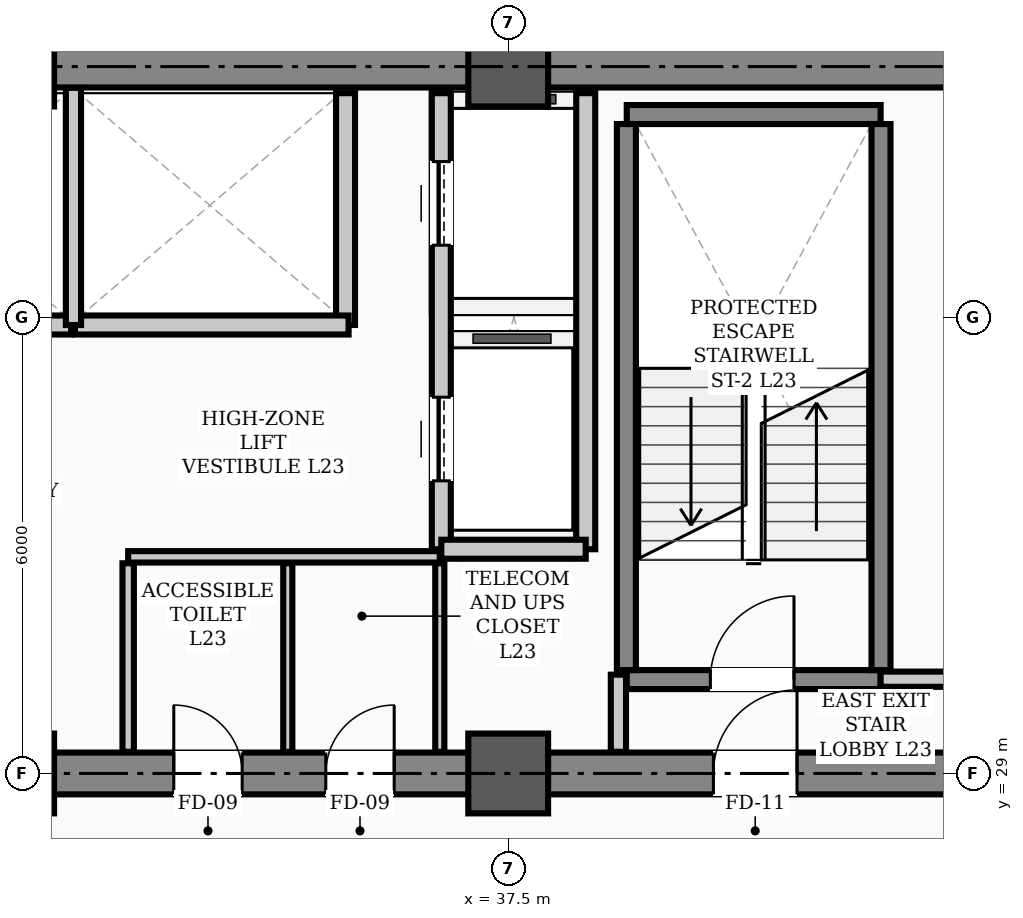
"""IFC4 building model, lengths in metres.
Left out: names, types, materials, properties, quantities, classifications, styles, units other than length and angle.
Written with IfcOpenShell. Run it as: python <this file> out.ifc"""

import sys

from ifc_helpers import new_model, si_unit, direction, frame, frame_2d, origin, origin_2d, place, context, subcontext, project, spatial, rectangle, hollow_rectangle, extrude, element, fill, save


model = new_model("IFC4")
c1 = context("Model", 3, precision=1e-05, world=origin(), true_north=direction((0.0, 1.0)))
c2 = subcontext(c1, "Body", "Model", "MODEL_VIEW")
j1 = project(units=[si_unit("LENGTHUNIT", "METRE"), si_unit("PLANEANGLEUNIT", "RADIAN")], contexts=[c1])
p1 = place(None, origin())
s1 = spatial("IfcSite", under=j1, at=p1, CompositionType="ELEMENT")
p2 = place(p1, origin())
s2 = spatial("IfcBuilding", under=s1, at=p2, CompositionType="ELEMENT")
p3 = place(p2, frame((0.0, 0.0, 92.8)))
s3 = spatial("IfcBuildingStorey", under=s2, at=p3, CompositionType="ELEMENT", Elevation=92.8)
for number, where, z_axis, x_axis in (
    (1, (31.0, 29.0, 0.0), (0.0, 0.0, 1.0), (1.0, 0.0, 0.0)),
    (2, (31.0, 38.3, 0.0), (0.0, 0.0, 1.0), (1.0, 0.0, 0.0)),
    (3, (37.5, 29.0, 0.0), (0.0, 0.0, 1.0), (1.0, 0.0, 0.0)),
    (4, (37.5, 38.3, 0.0), (0.0, 0.0, 1.0), (1.0, 0.0, 0.0)),
):
    element("IfcColumn", number, at=place(p3, frame(where, z_axis=z_axis, x_axis=x_axis)), inside=s3, PredefinedType="COLUMN", context=c2, shape_type="SweptSolid", body=[
        extrude(hollow_rectangle(XDim=1.05, YDim=1.05, WallThickness=0.038, InnerFilletRadius=0.019, OuterFilletRadius=0.057, at=origin_2d()), origin(), (0.0, 0.0, 1.0), 3.9),
    ])
p4 = place(p3, frame((13.5, 29.0, 0.0), z_axis=(0.0, 0.0, 1.0), x_axis=(1.0, 0.0, 0.0)))
e5 = element("IfcWall", 5, at=p4, inside=s3, PredefinedType="SHEAR", context=c2, shape_type="SweptSolid", body=[
    extrude(rectangle(XDim=30.5, YDim=0.55, at=frame_2d((15.25, 0.0))), origin(), (0.0, 0.0, 1.0), 3.72),
])
p5 = place(p4, frame((1.75, 0.0, 0.0)))
e6 = element("IfcOpeningElement", 6, at=p5, cuts=e5, PredefinedType="OPENING", context=c2, shape_type="SweptSolid", body=[
    extrude(rectangle(XDim=1.1, YDim=2.08, at=frame_2d((0.55, 1.04))), frame((0.0, 0.285, 0.0), z_axis=(0.0, -1.0, 0.0), x_axis=(1.0, 0.0, 0.0)), (0.0, 0.0, 1.0), 0.57),
])
p6 = place(p4, frame((26.7, 0.0, 0.0)))
e7 = element("IfcOpeningElement", 7, at=p6, cuts=e5, PredefinedType="OPENING", context=c2, shape_type="SweptSolid", body=[
    extrude(rectangle(XDim=1.1, YDim=2.08, at=frame_2d((0.55, 1.04))), frame((0.0, 0.285, 0.0), z_axis=(0.0, -1.0, 0.0), x_axis=(1.0, 0.0, 0.0)), (0.0, 0.0, 1.0), 0.57),
])
p7 = place(p4, frame((6.8, 0.0, 0.0)))
e8 = element("IfcOpeningElement", 8, at=p7, cuts=e5, PredefinedType="OPENING", context=c2, shape_type="SweptSolid", body=[
    extrude(rectangle(XDim=1.1, YDim=2.08, at=frame_2d((0.55, 1.04))), frame((0.0, 0.285, 0.0), z_axis=(0.0, -1.0, 0.0), x_axis=(1.0, 0.0, 0.0)), (0.0, 0.0, 1.0), 0.57),
])
p8 = place(p4, frame((13.2, 0.0, 0.0)))
e9 = element("IfcOpeningElement", 9, at=p8, cuts=e5, PredefinedType="OPENING", context=c2, shape_type="SweptSolid", body=[
    extrude(rectangle(XDim=1.6, YDim=2.08, at=frame_2d((0.8, 1.04))), frame((0.0, 0.285, 0.0), z_axis=(0.0, -1.0, 0.0), x_axis=(1.0, 0.0, 0.0)), (0.0, 0.0, 1.0), 0.57),
])
p9 = place(p4, frame((19.6, 0.0, 0.0)))
e10 = element("IfcOpeningElement", 10, at=p9, cuts=e5, PredefinedType="OPENING", context=c2, shape_type="SweptSolid", body=[
    extrude(rectangle(XDim=0.9, YDim=2.08, at=frame_2d((0.45, 1.04))), frame((0.0, 0.285, 0.0), z_axis=(0.0, -1.0, 0.0), x_axis=(1.0, 0.0, 0.0)), (0.0, 0.0, 1.0), 0.57),
])
p10 = place(p4, frame((21.6, 0.0, 0.0)))
e11 = element("IfcOpeningElement", 11, at=p10, cuts=e5, PredefinedType="OPENING", context=c2, shape_type="SweptSolid", body=[
    extrude(rectangle(XDim=0.9, YDim=2.08, at=frame_2d((0.45, 1.04))), frame((0.0, 0.285, 0.0), z_axis=(0.0, -1.0, 0.0), x_axis=(1.0, 0.0, 0.0)), (0.0, 0.0, 1.0), 0.57),
])
p11 = place(p3, frame((13.5, 38.3, 0.0), z_axis=(0.0, 0.0, 1.0), x_axis=(1.0, 0.0, 0.0)))
e12 = element("IfcWall", 12, at=p11, inside=s3, PredefinedType="SHEAR", context=c2, shape_type="SweptSolid", body=[
    extrude(rectangle(XDim=30.5, YDim=0.55, at=frame_2d((15.25, 0.0))), origin(), (0.0, 0.0, 1.0), 3.72),
])
p12 = place(p3, frame((39.06, 30.235, 0.0), z_axis=(0.0, 0.0, 1.0), x_axis=(1.0, 0.0, 0.0)))
e13 = element("IfcWall", 13, at=p12, inside=s3, PredefinedType="STANDARD", context=c2, shape_type="SweptSolid", body=[
    extrude(rectangle(XDim=3.34, YDim=0.25, at=frame_2d((1.67, 0.0))), origin(), (0.0, 0.0, 1.0), 3.72),
])
p13 = place(p12, frame((1.1, 0.0, 0.0)))
e14 = element("IfcOpeningElement", 14, at=p13, cuts=e13, PredefinedType="OPENING", context=c2, shape_type="SweptSolid", body=[
    extrude(rectangle(XDim=1.1, YDim=2.08, at=frame_2d((0.55, 1.04))), frame((0.0, 0.135, 0.0), z_axis=(0.0, -1.0, 0.0), x_axis=(1.0, 0.0, 0.0)), (0.0, 0.0, 1.0), 0.27),
])
p14 = place(p3, frame((39.06, 37.669, 0.0), z_axis=(0.0, 0.0, 1.0), x_axis=(1.0, 0.0, 0.0)))
e15 = element("IfcWall", 15, at=p14, inside=s3, PredefinedType="STANDARD", context=c2, shape_type="SweptSolid", body=[
    extrude(rectangle(XDim=3.34, YDim=0.25, at=frame_2d((1.67, 0.0))), origin(), (0.0, 0.0, 1.0), 3.72),
])
for number, where, z_axis, x_axis in (
    (16, (39.055, 30.36, 0.0), (0.0, 0.0, 1.0), (0.0, 1.0, 0.0)),
    (17, (42.405, 30.36, 0.0), (0.0, 0.0, 1.0), (0.0, 1.0, 0.0)),
):
    element("IfcWall", number, at=place(p3, frame(where, z_axis=z_axis, x_axis=x_axis)), inside=s3, PredefinedType="STANDARD", context=c2, shape_type="SweptSolid", body=[
        extrude(rectangle(XDim=7.184, YDim=0.25, at=frame_2d((3.592, 0.0))), origin(), (0.0, 0.0, 1.0), 3.72),
    ])
p15 = place(p3, frame((36.62, 31.95, 0.0), z_axis=(0.0, 0.0, 1.0), x_axis=(0.0, 1.0, 0.0)))
e18 = element("IfcWall", 18, at=p15, inside=s3, PredefinedType="STANDARD", context=c2, shape_type="SweptSolid", body=[
    extrude(rectangle(XDim=6.0, YDim=0.25, at=frame_2d((3.0, 0.0))), origin(), (0.0, 0.0, 1.0), 3.3),
])
p16 = place(p15, frame((0.9, 0.0, 0.0)))
e19 = element("IfcOpeningElement", 19, at=p16, cuts=e18, PredefinedType="OPENING", context=c2, shape_type="SweptSolid", body=[
    extrude(rectangle(XDim=1.1, YDim=2.08, at=frame_2d((0.55, 1.04))), frame((0.0, 0.135, 0.0), z_axis=(0.0, -1.0, 0.0), x_axis=(1.0, 0.0, 0.0)), (0.0, 0.0, 1.0), 0.27),
])
p17 = place(p15, frame((4.0, 0.0, 0.0)))
e20 = element("IfcOpeningElement", 20, at=p17, cuts=e18, PredefinedType="OPENING", context=c2, shape_type="SweptSolid", body=[
    extrude(rectangle(XDim=1.1, YDim=2.08, at=frame_2d((0.55, 1.04))), frame((0.0, 0.135, 0.0), z_axis=(0.0, -1.0, 0.0), x_axis=(1.0, 0.0, 0.0)), (0.0, 0.0, 1.0), 0.27),
])
p18 = place(p3, frame((38.52, 31.95, 0.0), z_axis=(0.0, 0.0, 1.0), x_axis=(0.0, 1.0, 0.0)))
e21 = element("IfcWall", 21, at=p18, inside=s3, PredefinedType="STANDARD", context=c2, shape_type="SweptSolid", body=[
    extrude(rectangle(XDim=6.0, YDim=0.25, at=frame_2d((3.0, 0.0))), origin(), (0.0, 0.0, 1.0), 3.3),
])
p19 = place(p3, frame((36.62, 31.95, 0.0), z_axis=(0.0, 0.0, 1.0), x_axis=(1.0, 0.0, 0.0)))
e22 = element("IfcWall", 22, at=p19, inside=s3, PredefinedType="STANDARD", context=c2, shape_type="SweptSolid", body=[
    extrude(rectangle(XDim=1.9, YDim=0.25, at=frame_2d((0.95, 0.0))), origin(), (0.0, 0.0, 1.0), 3.48),
])
p20 = place(p3, frame((35.36, 34.9, 0.0), z_axis=(0.0, 0.0, 1.0), x_axis=(0.0, 1.0, 0.0)))
e23 = element("IfcWall", 23, at=p20, inside=s3, PredefinedType="STANDARD", context=c2, shape_type="SweptSolid", body=[
    extrude(rectangle(XDim=3.05, YDim=0.25, at=frame_2d((1.525, 0.0))), origin(), (0.0, 0.0, 1.0), 3.3),
])
p21 = place(p3, frame((28.2, 34.9, 0.0), z_axis=(0.0, 0.0, 1.0), x_axis=(1.0, 0.0, 0.0)))
e24 = element("IfcWall", 24, at=p21, inside=s3, PredefinedType="STANDARD", context=c2, shape_type="SweptSolid", body=[
    extrude(rectangle(XDim=3.55, YDim=0.25, at=frame_2d((1.775, 0.0))), origin(), (0.0, 0.0, 1.0), 3.72),
])
p22 = place(p3, frame((31.8, 34.9, 0.0), z_axis=(0.0, 0.0, 1.0), x_axis=(1.0, 0.0, 0.0)))
e25 = element("IfcWall", 25, at=p22, inside=s3, PredefinedType="STANDARD", context=c2, shape_type="SweptSolid", body=[
    extrude(rectangle(XDim=3.6, YDim=0.25, at=frame_2d((1.8, 0.0))), origin(), (0.0, 0.0, 1.0), 3.72),
])
p23 = place(p3, frame((42.4, 30.24, 0.0), z_axis=(0.0, 0.0, 1.0), x_axis=(1.0, 0.0, 0.0)))
e26 = element("IfcWall", 26, at=p23, inside=s3, PredefinedType="STANDARD", context=c2, shape_type="SweptSolid", body=[
    extrude(rectangle(XDim=1.315, YDim=0.2, at=frame_2d((0.658, 0.0))), origin(), (0.0, 0.0, 1.0), 3.1),
])
p24 = place(p3, frame((32.5, 31.85, 0.0), z_axis=(0.0, 0.0, 1.0), x_axis=(1.0, 0.0, 0.0)))
e27 = element("IfcWall", 27, at=p24, inside=s3, PredefinedType="PARTITIONING", context=c2, shape_type="SweptSolid", body=[
    extrude(rectangle(XDim=4.1, YDim=0.15, at=frame_2d((2.05, 0.0))), origin(), (0.0, 0.0, 1.0), 3.72),
])
p25 = place(p3, frame((38.95, 29.285, 0.0), z_axis=(0.0, 0.0, 1.0), x_axis=(0.0, 1.0, 0.0)))
e28 = element("IfcWall", 28, at=p25, inside=s3, PredefinedType="STANDARD", context=c2, shape_type="SweptSolid", body=[
    extrude(rectangle(XDim=1.015, YDim=0.2, at=frame_2d((0.508, 0.0))), origin(), (0.0, 0.0, 1.0), 3.3),
])
p26 = place(p3, frame((32.5, 29.285, 0.0), z_axis=(0.0, 0.0, 1.0), x_axis=(0.0, 1.0, 0.0)))
e29 = element("IfcWall", 29, at=p26, inside=s3, PredefinedType="PARTITIONING", context=c2, shape_type="SweptSolid", body=[
    extrude(rectangle(XDim=2.48, YDim=0.15, at=frame_2d((1.24, 0.0))), origin(), (0.0, 0.0, 1.0), 3.3),
])
for number, where, z_axis, x_axis in (
    (30, (36.6, 29.285, 0.0), (0.0, 0.0, 1.0), (0.0, 1.0, 0.0)),
    (31, (34.6, 29.285, 0.0), (0.0, 0.0, 1.0), (0.0, 1.0, 0.0)),
):
    element("IfcWall", number, at=place(p3, frame(where, z_axis=z_axis, x_axis=x_axis)), inside=s3, PredefinedType="PARTITIONING", context=c2, shape_type="SweptSolid", body=[
        extrude(rectangle(XDim=2.48, YDim=0.12, at=frame_2d((1.24, 0.0))), origin(), (0.0, 0.0, 1.0), 3.3),
    ])
p27 = place(p3, frame((31.78, 34.9, 0.0), z_axis=(0.0, 0.0, 1.0), x_axis=(0.0, 1.0, 0.0)))
e32 = element("IfcWall", 32, at=p27, inside=s3, PredefinedType="STANDARD", context=c2, shape_type="SweptSolid", body=[
    extrude(rectangle(XDim=3.12, YDim=0.2, at=frame_2d((1.56, 0.0))), origin(), (0.0, 0.0, 1.0), 3.3),
])
p28 = place(p13, origin())
e33 = element("IfcDoor", 33, at=p28, inside=s3, OperationType="SINGLE_SWING_RIGHT", PredefinedType="DOOR", context=c2, shape_type="SweptSolid", body=[
    extrude(rectangle(XDim=1.1, YDim=2.08, at=frame_2d((0.55, 1.04))), frame((0.0, 0.025, 0.0), z_axis=(0.0, -1.0, 0.0), x_axis=(1.0, 0.0, 0.0)), (0.0, 0.0, 1.0), 0.05),
])
fill(e14, e33)
p29 = place(p6, origin())
e34 = element("IfcDoor", 34, at=p29, inside=s3, OperationType="SINGLE_SWING_RIGHT", PredefinedType="DOOR", context=c2, shape_type="SweptSolid", body=[
    extrude(rectangle(XDim=1.1, YDim=2.08, at=frame_2d((0.55, 1.04))), frame((0.0, 0.025, 0.0), z_axis=(0.0, -1.0, 0.0), x_axis=(1.0, 0.0, 0.0)), (0.0, 0.0, 1.0), 0.05),
])
fill(e7, e34)
p30 = place(p9, origin())
e35 = element("IfcDoor", 35, at=p30, inside=s3, OperationType="SINGLE_SWING_LEFT", PredefinedType="DOOR", context=c2, shape_type="SweptSolid", body=[
    extrude(rectangle(XDim=0.9, YDim=2.08, at=frame_2d((0.45, 1.04))), frame((0.0, 0.025, 0.0), z_axis=(0.0, -1.0, 0.0), x_axis=(1.0, 0.0, 0.0)), (0.0, 0.0, 1.0), 0.05),
])
fill(e10, e35)
p31 = place(p10, origin())
e36 = element("IfcDoor", 36, at=p31, inside=s3, OperationType="SINGLE_SWING_RIGHT", PredefinedType="DOOR", context=c2, shape_type="SweptSolid", body=[
    extrude(rectangle(XDim=0.9, YDim=2.08, at=frame_2d((0.45, 1.04))), frame((0.0, 0.025, 0.0), z_axis=(0.0, -1.0, 0.0), x_axis=(1.0, 0.0, 0.0)), (0.0, 0.0, 1.0), 0.05),
])
fill(e11, e36)
p32 = place(p16, origin())
e37 = element("IfcDoor", 37, at=p32, inside=s3, OperationType="SLIDING_TO_LEFT", PredefinedType="DOOR", context=c2, shape_type="SweptSolid", body=[
    extrude(rectangle(XDim=1.1, YDim=2.08, at=frame_2d((0.55, 1.04))), frame((0.0, 0.025, 0.0), z_axis=(0.0, -1.0, 0.0), x_axis=(1.0, 0.0, 0.0)), (0.0, 0.0, 1.0), 0.05),
])
fill(e19, e37)
p33 = place(p17, origin())
e38 = element("IfcDoor", 38, at=p33, inside=s3, OperationType="SLIDING_TO_LEFT", PredefinedType="DOOR", context=c2, shape_type="SweptSolid", body=[
    extrude(rectangle(XDim=1.1, YDim=2.08, at=frame_2d((0.55, 1.04))), frame((0.0, 0.025, 0.0), z_axis=(0.0, -1.0, 0.0), x_axis=(1.0, 0.0, 0.0)), (0.0, 0.0, 1.0), 0.05),
])
fill(e20, e38)
save(model, sys.argv[1])
